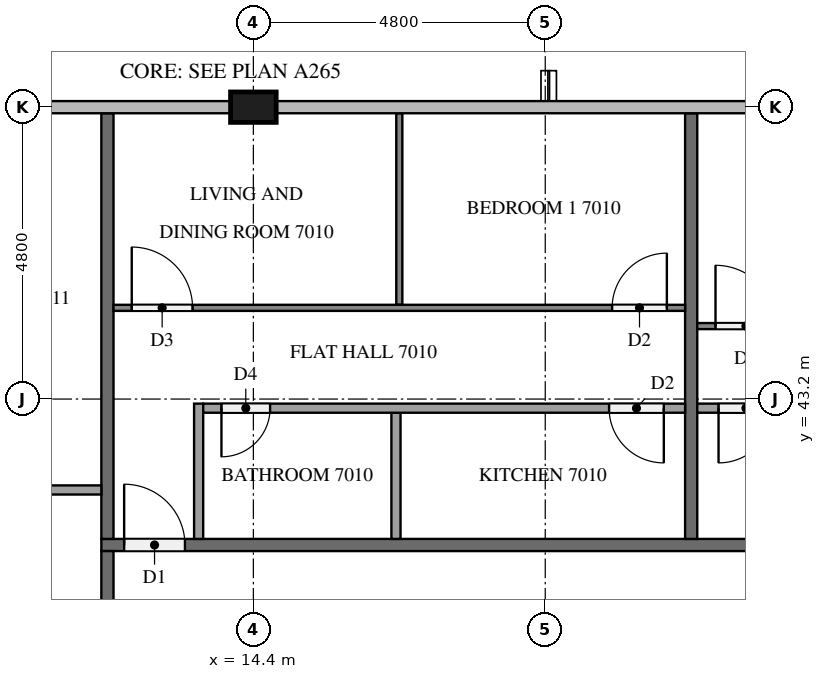
"""IFC4 building model, lengths in metres.
Left out: names, types, materials, properties, quantities, classifications, styles, units other than length and angle.
Written with IfcOpenShell. Run it as: python <this file> out.ifc"""

import sys

from ifc_helpers import new_model, si_unit, direction, frame, frame_2d, origin, origin_2d, place, context, subcontext, project, spatial, rectangle, extrude, element, fill, save


model = new_model("IFC4")
c1 = context("Model", 3, precision=1e-05, world=origin(), true_north=direction((0.0, 1.0)))
c2 = subcontext(c1, "Body", "Model", "MODEL_VIEW")
j1 = project(units=[si_unit("LENGTHUNIT", "METRE"), si_unit("PLANEANGLEUNIT", "RADIAN")], contexts=[c1])
p1 = place(None, origin())
s1 = spatial("IfcSite", under=j1, at=p1, CompositionType="ELEMENT")
p2 = place(p1, origin())
s2 = spatial("IfcBuilding", under=s1, at=p2, CompositionType="ELEMENT")
p3 = place(p2, frame((0.0, 0.0, 268.6)))
s3 = spatial("IfcBuildingStorey", under=s2, at=p3, CompositionType="ELEMENT", Elevation=268.6)
p4 = place(p3, frame((14.4, 48.0, 0.0), z_axis=(0.0, 0.0, 1.0), x_axis=(1.0, 0.0, 0.0)))
e1 = element("IfcColumn", 1, at=p4, inside=s3, PredefinedType="COLUMN", context=c2, shape_type="SweptSolid", body=[
    extrude(rectangle(XDim=0.75, YDim=0.5, at=origin_2d()), origin(), (0.0, 0.0, 1.0), 3.2),
])
p5 = place(p3, frame((11.9, 40.8, 0.0), z_axis=(0.0, 0.0, 1.0), x_axis=(1.0, 0.0, 0.0)))
e2 = element("IfcWall", 2, at=p5, inside=s3, PredefinedType="PARTITIONING", context=c2, shape_type="SweptSolid", body=[
    extrude(rectangle(XDim=38.6, YDim=0.2, at=frame_2d((19.3, 0.0))), origin(), (0.0, 0.0, 1.0), 3.2),
])
p6 = place(p5, frame((31.575, 0.0, 0.0)))
e3 = element("IfcOpeningElement", 3, at=p6, cuts=e2, PredefinedType="OPENING", context=c2, shape_type="SweptSolid", body=[
    extrude(rectangle(XDim=1.0, YDim=2.1, at=frame_2d((0.5, 1.05))), frame((0.0, 0.11, 0.0), z_axis=(0.0, -1.0, 0.0), x_axis=(1.0, 0.0, 0.0)), (0.0, 0.0, 1.0), 0.22),
])
p7 = place(p5, frame((24.375, 0.0, 0.0)))
e4 = element("IfcOpeningElement", 4, at=p7, cuts=e2, PredefinedType="OPENING", context=c2, shape_type="SweptSolid", body=[
    extrude(rectangle(XDim=1.0, YDim=2.1, at=frame_2d((0.5, 1.05))), frame((0.0, 0.11, 0.0), z_axis=(0.0, -1.0, 0.0), x_axis=(1.0, 0.0, 0.0)), (0.0, 0.0, 1.0), 0.22),
])
p8 = place(p5, frame((22.825, 0.0, 0.0)))
e5 = element("IfcOpeningElement", 5, at=p8, cuts=e2, PredefinedType="OPENING", context=c2, shape_type="SweptSolid", body=[
    extrude(rectangle(XDim=1.0, YDim=2.1, at=frame_2d((0.5, 1.05))), frame((0.0, 0.11, 0.0), z_axis=(0.0, -1.0, 0.0), x_axis=(1.0, 0.0, 0.0)), (0.0, 0.0, 1.0), 0.22),
])
p9 = place(p5, frame((0.375, 0.0, 0.0)))
e6 = element("IfcOpeningElement", 6, at=p9, cuts=e2, PredefinedType="OPENING", context=c2, shape_type="SweptSolid", body=[
    extrude(rectangle(XDim=1.0, YDim=2.1, at=frame_2d((0.5, 1.05))), frame((0.0, 0.11, 0.0), z_axis=(0.0, -1.0, 0.0), x_axis=(1.0, 0.0, 0.0)), (0.0, 0.0, 1.0), 0.22),
])
p10 = place(p3, frame((12.0, 12.1, 0.0), z_axis=(0.0, 0.0, 1.0), x_axis=(0.0, 1.0, 0.0)))
e7 = element("IfcWall", 7, at=p10, inside=s3, PredefinedType="PARTITIONING", context=c2, shape_type="SweptSolid", body=[
    extrude(rectangle(XDim=28.6, YDim=0.2, at=frame_2d((14.3, 0.0))), origin(), (0.0, 0.0, 1.0), 3.2),
])
p11 = place(p10, frame((24.175, 0.0, 0.0)))
e8 = element("IfcOpeningElement", 8, at=p11, cuts=e7, PredefinedType="OPENING", context=c2, shape_type="SweptSolid", body=[
    extrude(rectangle(XDim=1.0, YDim=2.1, at=frame_2d((0.5, 1.05))), frame((0.0, 0.11, 0.0), z_axis=(0.0, -1.0, 0.0), x_axis=(1.0, 0.0, 0.0)), (0.0, 0.0, 1.0), 0.22),
])
p12 = place(p10, frame((14.575, 0.0, 0.0)))
e9 = element("IfcOpeningElement", 9, at=p12, cuts=e7, PredefinedType="OPENING", context=c2, shape_type="SweptSolid", body=[
    extrude(rectangle(XDim=1.0, YDim=2.1, at=frame_2d((0.5, 1.05))), frame((0.0, 0.11, 0.0), z_axis=(0.0, -1.0, 0.0), x_axis=(1.0, 0.0, 0.0)), (0.0, 0.0, 1.0), 0.22),
])
p13 = place(p10, frame((0.175, 0.0, 0.0)))
e10 = element("IfcOpeningElement", 10, at=p13, cuts=e7, PredefinedType="OPENING", context=c2, shape_type="SweptSolid", body=[
    extrude(rectangle(XDim=1.0, YDim=2.1, at=frame_2d((0.5, 1.05))), frame((0.0, 0.11, 0.0), z_axis=(0.0, -1.0, 0.0), x_axis=(1.0, 0.0, 0.0)), (0.0, 0.0, 1.0), 0.22),
])
for number, where, z_axis, x_axis in (
    (11, (21.6, 47.9, 0.0), (0.0, 0.0, 1.0), (0.0, -1.0, 0.0)),
    (12, (12.0, 47.9, 0.0), (0.0, 0.0, 1.0), (0.0, -1.0, 0.0)),
):
    element("IfcWall", number, at=place(p3, frame(where, z_axis=z_axis, x_axis=x_axis)), inside=s3, PredefinedType="PARTITIONING", context=c2, shape_type="SweptSolid", body=[
        extrude(rectangle(XDim=7.0, YDim=0.2, at=frame_2d((3.5, 0.0))), origin(), (0.0, 0.0, 1.0), 3.2),
    ])
p14 = place(p3, frame((21.7, 44.4, 0.0), z_axis=(0.0, 0.0, 1.0), x_axis=(1.0, 0.0, 0.0)))
e13 = element("IfcWall", 13, at=p14, inside=s3, PredefinedType="PARTITIONING", context=c2, shape_type="SweptSolid", body=[
    extrude(rectangle(XDim=14.2, YDim=0.1, at=frame_2d((7.1, 0.0))), origin(), (0.0, 0.0, 1.0), 3.2),
])
p15 = place(p14, frame((9.85, 0.0, 0.0)))
e14 = element("IfcOpeningElement", 14, at=p15, cuts=e13, PredefinedType="OPENING", context=c2, shape_type="SweptSolid", body=[
    extrude(rectangle(XDim=0.9, YDim=2.1, at=frame_2d((0.45, 1.05))), frame((0.0, 0.06, 0.0), z_axis=(0.0, -1.0, 0.0), x_axis=(1.0, 0.0, 0.0)), (0.0, 0.0, 1.0), 0.12),
])
p16 = place(p14, frame((8.25, 0.0, 0.0)))
e15 = element("IfcOpeningElement", 15, at=p16, cuts=e13, PredefinedType="OPENING", context=c2, shape_type="SweptSolid", body=[
    extrude(rectangle(XDim=0.9, YDim=2.1, at=frame_2d((0.45, 1.05))), frame((0.0, 0.06, 0.0), z_axis=(0.0, -1.0, 0.0), x_axis=(1.0, 0.0, 0.0)), (0.0, 0.0, 1.0), 0.12),
])
p17 = place(p14, frame((0.3, 0.0, 0.0)))
e16 = element("IfcOpeningElement", 16, at=p17, cuts=e13, PredefinedType="OPENING", context=c2, shape_type="SweptSolid", body=[
    extrude(rectangle(XDim=1.0, YDim=2.1, at=frame_2d((0.5, 1.05))), frame((0.0, 0.06, 0.0), z_axis=(0.0, -1.0, 0.0), x_axis=(1.0, 0.0, 0.0)), (0.0, 0.0, 1.0), 0.12),
])
p18 = place(p3, frame((34.425, 43.05, 0.0), z_axis=(0.0, 0.0, 1.0), x_axis=(-1.0, 0.0, 0.0)))
e17 = element("IfcWall", 17, at=p18, inside=s3, PredefinedType="PARTITIONING", context=c2, shape_type="SweptSolid", body=[
    extrude(rectangle(XDim=12.725, YDim=0.15, at=frame_2d((6.363, 0.0))), origin(), (0.0, 0.0, 1.0), 3.2),
])
p19 = place(p18, frame((1.812, 0.0, 0.0)))
e18 = element("IfcOpeningElement", 18, at=p19, cuts=e17, PredefinedType="OPENING", context=c2, shape_type="SweptSolid", body=[
    extrude(rectangle(XDim=0.8, YDim=2.1, at=frame_2d((0.4, 1.05))), frame((0.0, 0.085, 0.0), z_axis=(0.0, -1.0, 0.0), x_axis=(1.0, 0.0, 0.0)), (0.0, 0.0, 1.0), 0.17),
])
p20 = place(p18, frame((3.261, 0.0, 0.0)))
e19 = element("IfcOpeningElement", 19, at=p20, cuts=e17, PredefinedType="OPENING", context=c2, shape_type="SweptSolid", body=[
    extrude(rectangle(XDim=0.9, YDim=2.1, at=frame_2d((0.45, 1.05))), frame((0.0, 0.085, 0.0), z_axis=(0.0, -1.0, 0.0), x_axis=(1.0, 0.0, 0.0)), (0.0, 0.0, 1.0), 0.17),
])
p21 = place(p18, frame((11.475, 0.0, 0.0)))
e20 = element("IfcOpeningElement", 20, at=p21, cuts=e17, PredefinedType="OPENING", context=c2, shape_type="SweptSolid", body=[
    extrude(rectangle(XDim=0.9, YDim=2.1, at=frame_2d((0.45, 1.05))), frame((0.0, 0.085, 0.0), z_axis=(0.0, -1.0, 0.0), x_axis=(1.0, 0.0, 0.0)), (0.0, 0.0, 1.0), 0.17),
])
p22 = place(p3, frame((16.8, 44.75, 0.0), z_axis=(0.0, 0.0, 1.0), x_axis=(0.0, 1.0, 0.0)))
e21 = element("IfcWall", 21, at=p22, inside=s3, PredefinedType="PARTITIONING", context=c2, shape_type="SweptSolid", body=[
    extrude(rectangle(XDim=3.15, YDim=0.1, at=frame_2d((1.575, 0.0))), origin(), (0.0, 0.0, 1.0), 3.2),
])
p23 = place(p3, frame((12.1, 44.7, 0.0), z_axis=(0.0, 0.0, 1.0), x_axis=(1.0, 0.0, 0.0)))
e22 = element("IfcWall", 22, at=p23, inside=s3, PredefinedType="PARTITIONING", context=c2, shape_type="SweptSolid", body=[
    extrude(rectangle(XDim=9.4, YDim=0.1, at=frame_2d((4.7, 0.0))), origin(), (0.0, 0.0, 1.0), 3.2),
])
p24 = place(p23, frame((0.3, 0.0, 0.0)))
e23 = element("IfcOpeningElement", 23, at=p24, cuts=e22, PredefinedType="OPENING", context=c2, shape_type="SweptSolid", body=[
    extrude(rectangle(XDim=1.0, YDim=2.1, at=frame_2d((0.5, 1.05))), frame((0.0, 0.06, 0.0), z_axis=(0.0, -1.0, 0.0), x_axis=(1.0, 0.0, 0.0)), (0.0, 0.0, 1.0), 0.12),
])
p25 = place(p23, frame((8.2, 0.0, 0.0)))
e24 = element("IfcOpeningElement", 24, at=p25, cuts=e22, PredefinedType="OPENING", context=c2, shape_type="SweptSolid", body=[
    extrude(rectangle(XDim=0.9, YDim=2.1, at=frame_2d((0.45, 1.05))), frame((0.0, 0.06, 0.0), z_axis=(0.0, -1.0, 0.0), x_axis=(1.0, 0.0, 0.0)), (0.0, 0.0, 1.0), 0.12),
])
p26 = place(p3, frame((16.745, 40.9, 0.0), z_axis=(0.0, 0.0, 1.0), x_axis=(0.0, 1.0, 0.0)))
e25 = element("IfcWall", 25, at=p26, inside=s3, PredefinedType="PARTITIONING", context=c2, shape_type="SweptSolid", body=[
    extrude(rectangle(XDim=2.075, YDim=0.15, at=frame_2d((1.038, 0.0))), origin(), (0.0, 0.0, 1.0), 3.2),
])
p27 = place(p3, frame((13.5, 40.9, 0.0), z_axis=(0.0, 0.0, 1.0), x_axis=(0.0, 1.0, 0.0)))
e26 = element("IfcWall", 26, at=p27, inside=s3, PredefinedType="PARTITIONING", context=c2, shape_type="SweptSolid", body=[
    extrude(rectangle(XDim=2.225, YDim=0.15, at=frame_2d((1.113, 0.0))), origin(), (0.0, 0.0, 1.0), 3.2),
])
p28 = place(p3, frame((21.5, 43.05, 0.0), z_axis=(0.0, 0.0, 1.0), x_axis=(-1.0, 0.0, 0.0)))
e27 = element("IfcWall", 27, at=p28, inside=s3, PredefinedType="PARTITIONING", context=c2, shape_type="SweptSolid", body=[
    extrude(rectangle(XDim=7.925, YDim=0.15, at=frame_2d((3.962, 0.0))), origin(), (0.0, 0.0, 1.0), 3.2),
])
p29 = place(p28, frame((6.825, 0.0, 0.0)))
e28 = element("IfcOpeningElement", 28, at=p29, cuts=e27, PredefinedType="OPENING", context=c2, shape_type="SweptSolid", body=[
    extrude(rectangle(XDim=0.8, YDim=2.1, at=frame_2d((0.4, 1.05))), frame((0.0, 0.085, 0.0), z_axis=(0.0, -1.0, 0.0), x_axis=(1.0, 0.0, 0.0)), (0.0, 0.0, 1.0), 0.17),
])
p30 = place(p28, frame((0.35, 0.0, 0.0)))
e29 = element("IfcOpeningElement", 29, at=p30, cuts=e27, PredefinedType="OPENING", context=c2, shape_type="SweptSolid", body=[
    extrude(rectangle(XDim=0.9, YDim=2.1, at=frame_2d((0.45, 1.05))), frame((0.0, 0.085, 0.0), z_axis=(0.0, -1.0, 0.0), x_axis=(1.0, 0.0, 0.0)), (0.0, 0.0, 1.0), 0.17),
])
p31 = place(p3, frame((11.9, 41.705, 0.0), z_axis=(0.0, 0.0, 1.0), x_axis=(-1.0, 0.0, 0.0)))
e30 = element("IfcWall", 30, at=p31, inside=s3, PredefinedType="PARTITIONING", context=c2, shape_type="SweptSolid", body=[
    extrude(rectangle(XDim=3.125, YDim=0.15, at=frame_2d((1.562, 0.0))), origin(), (0.0, 0.0, 1.0), 3.2),
])
p32 = place(p9, origin())
e31 = element("IfcDoor", 31, at=p32, inside=s3, OperationType="SINGLE_SWING_LEFT", PredefinedType="DOOR", context=c2, shape_type="SweptSolid", body=[
    extrude(rectangle(XDim=1.0, YDim=2.1, at=frame_2d((0.5, 1.05))), frame((0.0, 0.025, 0.0), z_axis=(0.0, -1.0, 0.0), x_axis=(1.0, 0.0, 0.0)), (0.0, 0.0, 1.0), 0.05),
])
fill(e6, e31)
p33 = place(p17, origin())
e32 = element("IfcDoor", 32, at=p33, inside=s3, OperationType="SINGLE_SWING_LEFT", PredefinedType="DOOR", context=c2, shape_type="SweptSolid", body=[
    extrude(rectangle(XDim=1.0, YDim=2.1, at=frame_2d((0.5, 1.05))), frame((0.0, 0.025, 0.0), z_axis=(0.0, -1.0, 0.0), x_axis=(1.0, 0.0, 0.0)), (0.0, 0.0, 1.0), 0.05),
])
fill(e16, e32)
p34 = place(p21, origin())
e33 = element("IfcDoor", 33, at=p34, inside=s3, OperationType="SINGLE_SWING_RIGHT", PredefinedType="DOOR", context=c2, shape_type="SweptSolid", body=[
    extrude(rectangle(XDim=0.9, YDim=2.1, at=frame_2d((0.45, 1.05))), frame((0.0, 0.025, 0.0), z_axis=(0.0, -1.0, 0.0), x_axis=(1.0, 0.0, 0.0)), (0.0, 0.0, 1.0), 0.05),
])
fill(e20, e33)
p35 = place(p24, origin())
e34 = element("IfcDoor", 34, at=p35, inside=s3, OperationType="SINGLE_SWING_LEFT", PredefinedType="DOOR", context=c2, shape_type="SweptSolid", body=[
    extrude(rectangle(XDim=1.0, YDim=2.1, at=frame_2d((0.5, 1.05))), frame((0.0, 0.025, 0.0), z_axis=(0.0, -1.0, 0.0), x_axis=(1.0, 0.0, 0.0)), (0.0, 0.0, 1.0), 0.05),
])
fill(e23, e34)
p36 = place(p25, origin())
e35 = element("IfcDoor", 35, at=p36, inside=s3, OperationType="SINGLE_SWING_RIGHT", PredefinedType="DOOR", context=c2, shape_type="SweptSolid", body=[
    extrude(rectangle(XDim=0.9, YDim=2.1, at=frame_2d((0.45, 1.05))), frame((0.0, 0.025, 0.0), z_axis=(0.0, -1.0, 0.0), x_axis=(1.0, 0.0, 0.0)), (0.0, 0.0, 1.0), 0.05),
])
fill(e24, e35)
p37 = place(p29, origin())
e36 = element("IfcDoor", 36, at=p37, inside=s3, OperationType="SINGLE_SWING_RIGHT", PredefinedType="DOOR", context=c2, shape_type="SweptSolid", body=[
    extrude(rectangle(XDim=0.8, YDim=2.1, at=frame_2d((0.4, 1.05))), frame((0.0, 0.025, 0.0), z_axis=(0.0, -1.0, 0.0), x_axis=(1.0, 0.0, 0.0)), (0.0, 0.0, 1.0), 0.05),
])
fill(e28, e36)
p38 = place(p30, origin())
e37 = element("IfcDoor", 37, at=p38, inside=s3, OperationType="SINGLE_SWING_LEFT", PredefinedType="DOOR", context=c2, shape_type="SweptSolid", body=[
    extrude(rectangle(XDim=0.9, YDim=2.1, at=frame_2d((0.45, 1.05))), frame((0.0, 0.025, 0.0), z_axis=(0.0, -1.0, 0.0), x_axis=(1.0, 0.0, 0.0)), (0.0, 0.0, 1.0), 0.05),
])
fill(e29, e37)
save(model, sys.argv[1])
